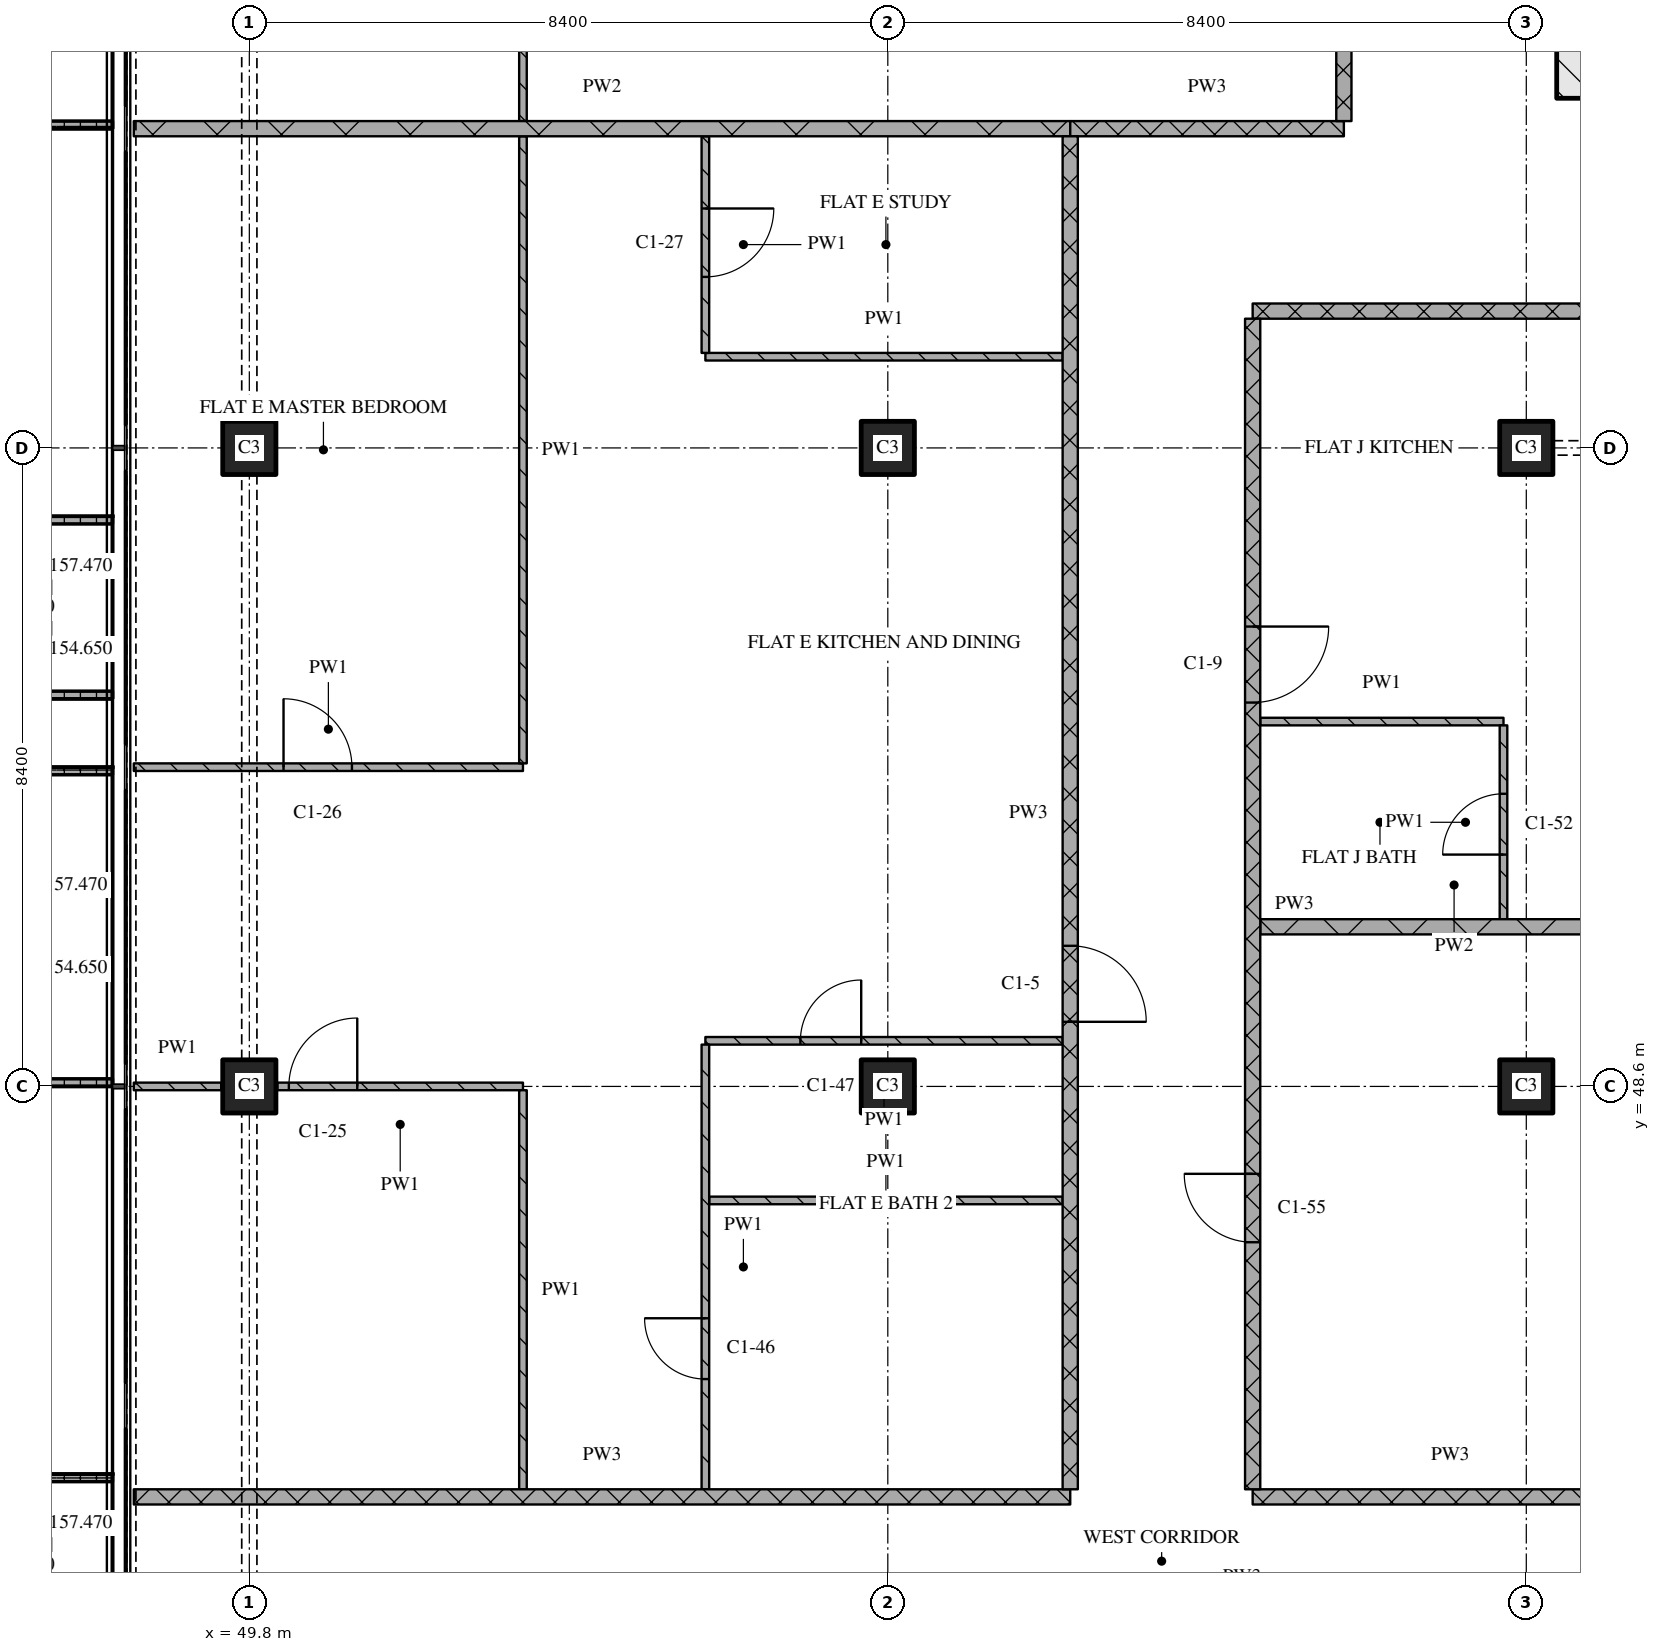
"""IFC4 building model, lengths in metres.
Left out: names, types, materials, properties, quantities, classifications, styles, units other than length and angle.
Written with IfcOpenShell. Run it as: python <this file> out.ifc"""

import sys

from ifc_helpers import new_model, si_unit, direction, frame, frame_2d, origin, origin_2d, place, context, subcontext, project, spatial, polyline, rectangle, outline, extrude, element, fill, save


model = new_model("IFC4")
c1 = context("Model", 3, precision=1e-05, world=origin(), true_north=direction((0.0, 1.0)))
c2 = subcontext(c1, "Body", "Model", "MODEL_VIEW")
j1 = project(units=[si_unit("LENGTHUNIT", "METRE"), si_unit("PLANEANGLEUNIT", "RADIAN")], contexts=[c1])
p1 = place(None, origin())
s1 = spatial("IfcSite", under=j1, at=p1, CompositionType="ELEMENT")
p2 = place(p1, origin())
s2 = spatial("IfcBuilding", under=s1, at=p2, CompositionType="ELEMENT")
p3 = place(p2, frame((0.0, 0.0, 154.65)))
s3 = spatial("IfcBuildingStorey", under=s2, at=p3, CompositionType="ELEMENT", Elevation=154.65)
for number, where, z_axis, x_axis in (
    (1, (49.8, 48.6, 0.0), (0.0, 0.0, 1.0), (1.0, 0.0, 0.0)),
    (2, (49.8, 57.0, 0.0), (0.0, 0.0, 1.0), (1.0, 0.0, 0.0)),
    (3, (58.2, 48.6, 0.0), (0.0, 0.0, 1.0), (1.0, 0.0, 0.0)),
    (4, (58.2, 57.0, 0.0), (0.0, 0.0, 1.0), (1.0, 0.0, 0.0)),
    (5, (66.6, 48.6, 0.0), (0.0, 0.0, 1.0), (1.0, 0.0, 0.0)),
    (6, (66.6, 57.0, 0.0), (0.0, 0.0, 1.0), (1.0, 0.0, 0.0)),
):
    element("IfcColumn", number, at=place(p3, frame(where, z_axis=z_axis, x_axis=x_axis)), inside=s3, PredefinedType="COLUMN", context=c2, shape_type="SweptSolid", body=[
        extrude(rectangle(XDim=0.7, YDim=0.7, at=origin_2d()), origin(), (0.0, 0.0, 1.0), 3.6),
    ])
p4 = place(p3, origin())
e7 = element("IfcWall", 7, at=p4, inside=s3, PredefinedType="SOLIDWALL", context=c2, shape_type="SweptSolid", body=[
    extrude(outline(polyline([(48.0, 65.4), (48.0, 65.3), (46.367, 65.3), (46.367, 61.3), (48.0, 61.3), (48.0, 61.2), (46.267, 61.2), (46.267, 65.4), (48.0, 65.4)])), origin(), (0.0, 0.0, 1.0), 1.0),
])
p5 = place(p3, origin())
e8 = element("IfcWall", 8, at=p5, inside=s3, PredefinedType="SOLIDWALL", context=c2, shape_type="SweptSolid", body=[
    extrude(outline(polyline([(48.0, 56.1), (48.0, 56.0), (46.5, 56.0), (46.5, 53.8), (48.0, 53.8), (48.0, 53.7), (46.4, 53.7), (46.4, 56.1), (48.0, 56.1)])), origin(), (0.0, 0.0, 1.0), 1.0),
])
p6 = place(p3, origin())
e9 = element("IfcWall", 9, at=p6, inside=s3, PredefinedType="SOLIDWALL", context=c2, shape_type="SweptSolid", body=[
    extrude(outline(polyline([(48.0, 52.8), (48.0, 52.7), (46.367, 52.7), (46.367, 48.7), (48.0, 48.7), (48.0, 48.6), (46.267, 48.6), (46.267, 52.8), (48.0, 52.8)])), origin(), (0.0, 0.0, 1.0), 1.0),
])
p7 = place(p3, origin())
e10 = element("IfcWall", 10, at=p7, inside=s3, PredefinedType="SOLIDWALL", context=c2, shape_type="SweptSolid", body=[
    extrude(outline(polyline([(48.0, 43.5), (48.0, 43.4), (46.5, 43.4), (46.5, 41.2), (48.0, 41.2), (48.0, 41.1), (46.4, 41.1), (46.4, 43.5), (48.0, 43.5)])), origin(), (0.0, 0.0, 1.0), 1.0),
])
p8 = place(p3, frame((67.0, 62.0, 0.0), z_axis=(0.0, 0.0, 1.0), x_axis=(1.0, 0.0, 0.0)))
e11 = element("IfcWall", 11, at=p8, inside=s3, PredefinedType="SOLIDWALL", context=c2, shape_type="SweptSolid", body=[
    extrude(rectangle(XDim=41.2, YDim=0.8, at=frame_2d((20.6, 0.0))), origin(), (0.0, 0.0, 1.0), 3.32),
])
p9 = place(p8, frame((20.95, 0.0, 0.0)))
e12 = element("IfcOpeningElement", 12, at=p9, cuts=e11, PredefinedType="OPENING", context=c2, shape_type="SweptSolid", body=[
    extrude(rectangle(XDim=1.8, YDim=2.1, at=frame_2d((0.9, 1.05))), frame((0.0, 0.41, 0.0), z_axis=(0.0, -1.0, 0.0), x_axis=(1.0, 0.0, 0.0)), (0.0, 0.0, 1.0), 0.82),
])
p10 = place(p3, frame((48.28, 43.2, 0.0), z_axis=(0.0, 0.0, 1.0), x_axis=(1.0, 0.0, 0.0)))
e13 = element("IfcWall", 13, at=p10, inside=s3, PredefinedType="PARTITIONING", context=c2, shape_type="SweptSolid", body=[
    extrude(rectangle(XDim=12.32, YDim=0.2, at=frame_2d((6.16, 0.0))), origin(), (0.0, 0.0, 1.0), 3.32),
])
p11 = place(p3, frame((63.0, 43.2, 0.0), z_axis=(0.0, 0.0, 1.0), x_axis=(1.0, 0.0, 0.0)))
e14 = element("IfcWall", 14, at=p11, inside=s3, PredefinedType="PARTITIONING", context=c2, shape_type="SweptSolid", body=[
    extrude(rectangle(XDim=5.2, YDim=0.2, at=frame_2d((2.6, 0.0))), origin(), (0.0, 0.0, 1.0), 3.32),
])
p12 = place(p3, frame((55.85, 47.1, 0.0), z_axis=(0.0, 0.0, 1.0), x_axis=(1.0, 0.0, 0.0)))
e15 = element("IfcWall", 15, at=p12, inside=s3, PredefinedType="PARTITIONING", context=c2, shape_type="SweptSolid", body=[
    extrude(rectangle(XDim=4.65, YDim=0.1, at=frame_2d((2.325, 0.0))), origin(), (0.0, 0.0, 1.0), 3.32),
])
p13 = place(p3, frame((48.28, 48.6, 0.0), z_axis=(0.0, 0.0, 1.0), x_axis=(1.0, 0.0, 0.0)))
e16 = element("IfcWall", 16, at=p13, inside=s3, PredefinedType="PARTITIONING", context=c2, shape_type="SweptSolid", body=[
    extrude(rectangle(XDim=1.15, YDim=0.1, at=frame_2d((0.575, 0.0))), origin(), (0.0, 0.0, 1.0), 3.32),
])
p14 = place(p3, frame((53.4, 48.6, 0.0), z_axis=(0.0, 0.0, 1.0), x_axis=(-1.0, 0.0, 0.0)))
e17 = element("IfcWall", 17, at=p14, inside=s3, PredefinedType="PARTITIONING", context=c2, shape_type="SweptSolid", body=[
    extrude(rectangle(XDim=3.23, YDim=0.1, at=frame_2d((1.615, 0.0))), origin(), (0.0, 0.0, 1.0), 3.32),
])
p15 = place(p14, frame((2.18, 0.0, 0.0)))
e18 = element("IfcOpeningElement", 18, at=p15, cuts=e17, PredefinedType="OPENING", context=c2, shape_type="SweptSolid", body=[
    extrude(rectangle(XDim=0.9, YDim=2.1, at=frame_2d((0.45, 1.05))), frame((0.0, 0.06, 0.0), z_axis=(0.0, -1.0, 0.0), x_axis=(1.0, 0.0, 0.0)), (0.0, 0.0, 1.0), 0.12),
])
p16 = place(p3, frame((60.5, 49.2, 0.0), z_axis=(0.0, 0.0, 1.0), x_axis=(-1.0, 0.0, 0.0)))
e19 = element("IfcWall", 19, at=p16, inside=s3, PredefinedType="PARTITIONING", context=c2, shape_type="SweptSolid", body=[
    extrude(rectangle(XDim=4.7, YDim=0.1, at=frame_2d((2.35, 0.0))), origin(), (0.0, 0.0, 1.0), 3.32),
])
p17 = place(p16, frame((2.65, 0.0, 0.0)))
e20 = element("IfcOpeningElement", 20, at=p17, cuts=e19, PredefinedType="OPENING", context=c2, shape_type="SweptSolid", body=[
    extrude(rectangle(XDim=0.8, YDim=2.1, at=frame_2d((0.4, 1.05))), frame((0.0, 0.06, 0.0), z_axis=(0.0, -1.0, 0.0), x_axis=(1.0, 0.0, 0.0)), (0.0, 0.0, 1.0), 0.12),
])
p18 = place(p3, frame((63.1, 50.7, 0.0), z_axis=(0.0, 0.0, 1.0), x_axis=(1.0, 0.0, 0.0)))
e21 = element("IfcWall", 21, at=p18, inside=s3, PredefinedType="PARTITIONING", context=c2, shape_type="SweptSolid", body=[
    extrude(rectangle(XDim=5.1, YDim=0.2, at=frame_2d((2.55, 0.0))), origin(), (0.0, 0.0, 1.0), 3.32),
])
p19 = place(p3, frame((48.28, 52.8, 0.0), z_axis=(0.0, 0.0, 1.0), x_axis=(1.0, 0.0, 0.0)))
e22 = element("IfcWall", 22, at=p19, inside=s3, PredefinedType="PARTITIONING", context=c2, shape_type="SweptSolid", body=[
    extrude(rectangle(XDim=5.12, YDim=0.1, at=frame_2d((2.56, 0.0))), origin(), (0.0, 0.0, 1.0), 3.32),
])
p20 = place(p19, frame((1.97, 0.0, 0.0)))
e23 = element("IfcOpeningElement", 23, at=p20, cuts=e22, PredefinedType="OPENING", context=c2, shape_type="SweptSolid", body=[
    extrude(rectangle(XDim=0.9, YDim=2.1, at=frame_2d((0.45, 1.05))), frame((0.0, 0.06, 0.0), z_axis=(0.0, -1.0, 0.0), x_axis=(1.0, 0.0, 0.0)), (0.0, 0.0, 1.0), 0.12),
])
p21 = place(p3, frame((63.1, 53.4, 0.0), z_axis=(0.0, 0.0, 1.0), x_axis=(1.0, 0.0, 0.0)))
e24 = element("IfcWall", 24, at=p21, inside=s3, PredefinedType="PARTITIONING", context=c2, shape_type="SweptSolid", body=[
    extrude(rectangle(XDim=3.2, YDim=0.1, at=frame_2d((1.6, 0.0))), origin(), (0.0, 0.0, 1.0), 3.32),
])
p22 = place(p3, frame((55.8, 58.2, 0.0), z_axis=(0.0, 0.0, 1.0), x_axis=(1.0, 0.0, 0.0)))
e25 = element("IfcWall", 25, at=p22, inside=s3, PredefinedType="PARTITIONING", context=c2, shape_type="SweptSolid", body=[
    extrude(rectangle(XDim=4.7, YDim=0.1, at=frame_2d((2.35, 0.0))), origin(), (0.0, 0.0, 1.0), 3.32),
])
p23 = place(p3, frame((63.0, 58.8, 0.0), z_axis=(0.0, 0.0, 1.0), x_axis=(1.0, 0.0, 0.0)))
e26 = element("IfcWall", 26, at=p23, inside=s3, PredefinedType="PARTITIONING", context=c2, shape_type="SweptSolid", body=[
    extrude(rectangle(XDim=10.8, YDim=0.2, at=frame_2d((5.4, 0.0))), origin(), (0.0, 0.0, 1.0), 3.32),
])
p24 = place(p3, frame((60.6, 61.2, 0.0), z_axis=(0.0, 0.0, 1.0), x_axis=(1.0, 0.0, 0.0)))
e27 = element("IfcWall", 27, at=p24, inside=s3, PredefinedType="PARTITIONING", context=c2, shape_type="SweptSolid", body=[
    extrude(rectangle(XDim=3.6, YDim=0.2, at=frame_2d((1.8, 0.0))), origin(), (0.0, 0.0, 1.0), 3.32),
])
p25 = place(p3, frame((48.28, 61.2, 0.0), z_axis=(0.0, 0.0, 1.0), x_axis=(1.0, 0.0, 0.0)))
e28 = element("IfcWall", 28, at=p25, inside=s3, PredefinedType="PARTITIONING", context=c2, shape_type="SweptSolid", body=[
    extrude(rectangle(XDim=12.32, YDim=0.2, at=frame_2d((6.16, 0.0))), origin(), (0.0, 0.0, 1.0), 3.32),
])
p26 = place(p3, frame((53.4, 48.55, 0.0), z_axis=(0.0, 0.0, 1.0), x_axis=(0.0, -1.0, 0.0)))
e29 = element("IfcWall", 29, at=p26, inside=s3, PredefinedType="PARTITIONING", context=c2, shape_type="SweptSolid", body=[
    extrude(rectangle(XDim=5.25, YDim=0.1, at=frame_2d((2.625, 0.0))), origin(), (0.0, 0.0, 1.0), 3.32),
])
p27 = place(p3, frame((55.8, 49.15, 0.0), z_axis=(0.0, 0.0, 1.0), x_axis=(0.0, -1.0, 0.0)))
e30 = element("IfcWall", 30, at=p27, inside=s3, PredefinedType="PARTITIONING", context=c2, shape_type="SweptSolid", body=[
    extrude(rectangle(XDim=5.85, YDim=0.1, at=frame_2d((2.925, 0.0))), origin(), (0.0, 0.0, 1.0), 3.32),
])
p28 = place(p27, frame((3.6, 0.0, 0.0)))
e31 = element("IfcOpeningElement", 31, at=p28, cuts=e30, PredefinedType="OPENING", context=c2, shape_type="SweptSolid", body=[
    extrude(rectangle(XDim=0.8, YDim=2.1, at=frame_2d((0.4, 1.05))), frame((0.0, 0.06, 0.0), z_axis=(0.0, -1.0, 0.0), x_axis=(1.0, 0.0, 0.0)), (0.0, 0.0, 1.0), 0.12),
])
p29 = place(p3, frame((55.8, 61.1, 0.0), z_axis=(0.0, 0.0, 1.0), x_axis=(0.0, -1.0, 0.0)))
e32 = element("IfcWall", 32, at=p29, inside=s3, PredefinedType="PARTITIONING", context=c2, shape_type="SweptSolid", body=[
    extrude(rectangle(XDim=2.85, YDim=0.1, at=frame_2d((1.425, 0.0))), origin(), (0.0, 0.0, 1.0), 3.32),
])
p30 = place(p29, frame((0.95, 0.0, 0.0)))
e33 = element("IfcOpeningElement", 33, at=p30, cuts=e32, PredefinedType="OPENING", context=c2, shape_type="SweptSolid", body=[
    extrude(rectangle(XDim=0.9, YDim=2.1, at=frame_2d((0.45, 1.05))), frame((0.0, 0.06, 0.0), z_axis=(0.0, -1.0, 0.0), x_axis=(1.0, 0.0, 0.0)), (0.0, 0.0, 1.0), 0.12),
])
p31 = place(p3, frame((60.6, 43.3, 0.0), z_axis=(0.0, 0.0, 1.0), x_axis=(0.0, 1.0, 0.0)))
e34 = element("IfcWall", 34, at=p31, inside=s3, PredefinedType="PARTITIONING", context=c2, shape_type="SweptSolid", body=[
    extrude(rectangle(XDim=17.8, YDim=0.2, at=frame_2d((8.9, 0.0))), origin(), (0.0, 0.0, 1.0), 3.32),
])
p32 = place(p31, frame((6.15, 0.0, 0.0)))
e35 = element("IfcOpeningElement", 35, at=p32, cuts=e34, PredefinedType="OPENING", context=c2, shape_type="SweptSolid", body=[
    extrude(rectangle(XDim=1.0, YDim=2.1, at=frame_2d((0.5, 1.05))), frame((0.0, 0.11, 0.0), z_axis=(0.0, -1.0, 0.0), x_axis=(1.0, 0.0, 0.0)), (0.0, 0.0, 1.0), 0.22),
])
p33 = place(p3, frame((63.0, 58.7, 0.0), z_axis=(0.0, 0.0, 1.0), x_axis=(0.0, -1.0, 0.0)))
e36 = element("IfcWall", 36, at=p33, inside=s3, PredefinedType="PARTITIONING", context=c2, shape_type="SweptSolid", body=[
    extrude(rectangle(XDim=15.4, YDim=0.2, at=frame_2d((7.7, 0.0))), origin(), (0.0, 0.0, 1.0), 3.32),
])
p34 = place(p33, frame((4.05, 0.0, 0.0)))
e37 = element("IfcOpeningElement", 37, at=p34, cuts=e36, PredefinedType="OPENING", context=c2, shape_type="SweptSolid", body=[
    extrude(rectangle(XDim=1.0, YDim=2.1, at=frame_2d((0.5, 1.05))), frame((0.0, 0.11, 0.0), z_axis=(0.0, -1.0, 0.0), x_axis=(1.0, 0.0, 0.0)), (0.0, 0.0, 1.0), 0.22),
])
p35 = place(p33, frame((11.25, 0.0, 0.0)))
e38 = element("IfcOpeningElement", 38, at=p35, cuts=e36, PredefinedType="OPENING", context=c2, shape_type="SweptSolid", body=[
    extrude(rectangle(XDim=0.9, YDim=2.1, at=frame_2d((0.45, 1.05))), frame((0.0, 0.11, 0.0), z_axis=(0.0, -1.0, 0.0), x_axis=(1.0, 0.0, 0.0)), (0.0, 0.0, 1.0), 0.22),
])
p36 = place(p3, frame((64.2, 61.3, 0.0), z_axis=(0.0, 0.0, 1.0), x_axis=(0.0, 1.0, 0.0)))
e39 = element("IfcWall", 39, at=p36, inside=s3, PredefinedType="PARTITIONING", context=c2, shape_type="SweptSolid", body=[
    extrude(rectangle(XDim=14.02, YDim=0.2, at=frame_2d((7.01, 0.0))), origin(), (0.0, 0.0, 1.0), 3.32),
])
p37 = place(p36, frame((6.75, 0.0, 0.0)))
e40 = element("IfcOpeningElement", 40, at=p37, cuts=e39, PredefinedType="OPENING", context=c2, shape_type="SweptSolid", body=[
    extrude(rectangle(XDim=1.0, YDim=2.1, at=frame_2d((0.5, 1.05))), frame((0.0, 0.11, 0.0), z_axis=(0.0, -1.0, 0.0), x_axis=(1.0, 0.0, 0.0)), (0.0, 0.0, 1.0), 0.22),
])
p38 = place(p3, frame((66.3, 50.8, 0.0), z_axis=(0.0, 0.0, 1.0), x_axis=(0.0, 1.0, 0.0)))
e41 = element("IfcWall", 41, at=p38, inside=s3, PredefinedType="PARTITIONING", context=c2, shape_type="SweptSolid", body=[
    extrude(rectangle(XDim=2.55, YDim=0.1, at=frame_2d((1.275, 0.0))), origin(), (0.0, 0.0, 1.0), 3.32),
])
p39 = place(p38, frame((0.85, 0.0, 0.0)))
e42 = element("IfcOpeningElement", 42, at=p39, cuts=e41, PredefinedType="OPENING", context=c2, shape_type="SweptSolid", body=[
    extrude(rectangle(XDim=0.8, YDim=2.1, at=frame_2d((0.4, 1.05))), frame((0.0, 0.06, 0.0), z_axis=(0.0, -1.0, 0.0), x_axis=(1.0, 0.0, 0.0)), (0.0, 0.0, 1.0), 0.12),
])
p40 = place(p3, frame((53.4, 61.1, 0.0), z_axis=(0.0, 0.0, 1.0), x_axis=(0.0, -1.0, 0.0)))
e43 = element("IfcWall", 43, at=p40, inside=s3, PredefinedType="PARTITIONING", context=c2, shape_type="SweptSolid", body=[
    extrude(rectangle(XDim=8.25, YDim=0.1, at=frame_2d((4.125, 0.0))), origin(), (0.0, 0.0, 1.0), 3.32),
])
p41 = place(p3, frame((53.4, 61.3, 0.0), z_axis=(0.0, 0.0, 1.0), x_axis=(0.0, 1.0, 0.0)))
e44 = element("IfcWall", 44, at=p41, inside=s3, PredefinedType="PARTITIONING", context=c2, shape_type="SweptSolid", body=[
    extrude(rectangle(XDim=8.25, YDim=0.1, at=frame_2d((4.125, 0.0))), origin(), (0.0, 0.0, 1.0), 3.32),
])
p42 = place(p41, frame((3.65, 0.0, 0.0)))
e45 = element("IfcOpeningElement", 45, at=p42, cuts=e44, PredefinedType="OPENING", context=c2, shape_type="SweptSolid", body=[
    extrude(rectangle(XDim=0.9, YDim=2.1, at=frame_2d((0.45, 1.05))), frame((0.0, 0.06, 0.0), z_axis=(0.0, -1.0, 0.0), x_axis=(1.0, 0.0, 0.0)), (0.0, 0.0, 1.0), 0.12),
])
p43 = place(p15, origin())
e46 = element("IfcDoor", 46, at=p43, inside=s3, OperationType="SINGLE_SWING_RIGHT", PredefinedType="DOOR", context=c2, shape_type="SweptSolid", body=[
    extrude(rectangle(XDim=0.9, YDim=2.1, at=frame_2d((0.45, 1.05))), frame((0.0, 0.025, 0.0), z_axis=(0.0, -1.0, 0.0), x_axis=(1.0, 0.0, 0.0)), (0.0, 0.0, 1.0), 0.05),
])
fill(e18, e46)
p44 = place(p17, origin())
e47 = element("IfcDoor", 47, at=p44, inside=s3, OperationType="SINGLE_SWING_RIGHT", PredefinedType="DOOR", context=c2, shape_type="SweptSolid", body=[
    extrude(rectangle(XDim=0.8, YDim=2.1, at=frame_2d((0.4, 1.05))), frame((0.0, 0.025, 0.0), z_axis=(0.0, -1.0, 0.0), x_axis=(1.0, 0.0, 0.0)), (0.0, 0.0, 1.0), 0.05),
])
fill(e20, e47)
p45 = place(p20, origin())
e48 = element("IfcDoor", 48, at=p45, inside=s3, OperationType="SINGLE_SWING_LEFT", PredefinedType="DOOR", context=c2, shape_type="SweptSolid", body=[
    extrude(rectangle(XDim=0.9, YDim=2.1, at=frame_2d((0.45, 1.05))), frame((0.0, 0.025, 0.0), z_axis=(0.0, -1.0, 0.0), x_axis=(1.0, 0.0, 0.0)), (0.0, 0.0, 1.0), 0.05),
])
fill(e23, e48)
p46 = place(p28, origin())
e49 = element("IfcDoor", 49, at=p46, inside=s3, OperationType="SINGLE_SWING_RIGHT", PredefinedType="DOOR", context=c2, shape_type="SweptSolid", body=[
    extrude(rectangle(XDim=0.8, YDim=2.1, at=frame_2d((0.4, 1.05))), frame((0.0, 0.025, 0.0), z_axis=(0.0, -1.0, 0.0), x_axis=(1.0, 0.0, 0.0)), (0.0, 0.0, 1.0), 0.05),
])
fill(e31, e49)
p47 = place(p30, origin())
e50 = element("IfcDoor", 50, at=p47, inside=s3, OperationType="SINGLE_SWING_LEFT", PredefinedType="DOOR", context=c2, shape_type="SweptSolid", body=[
    extrude(rectangle(XDim=0.9, YDim=2.1, at=frame_2d((0.45, 1.05))), frame((0.0, 0.025, 0.0), z_axis=(0.0, -1.0, 0.0), x_axis=(1.0, 0.0, 0.0)), (0.0, 0.0, 1.0), 0.05),
])
fill(e33, e50)
p48 = place(p32, origin())
e51 = element("IfcDoor", 51, at=p48, inside=s3, OperationType="SINGLE_SWING_RIGHT", PredefinedType="DOOR", context=c2, shape_type="SweptSolid", body=[
    extrude(rectangle(XDim=1.0, YDim=2.1, at=frame_2d((0.5, 1.05))), frame((0.0, 0.025, 0.0), z_axis=(0.0, -1.0, 0.0), x_axis=(1.0, 0.0, 0.0)), (0.0, 0.0, 1.0), 0.05),
])
fill(e35, e51)
p49 = place(p34, origin())
e52 = element("IfcDoor", 52, at=p49, inside=s3, OperationType="SINGLE_SWING_LEFT", PredefinedType="DOOR", context=c2, shape_type="SweptSolid", body=[
    extrude(rectangle(XDim=1.0, YDim=2.1, at=frame_2d((0.5, 1.05))), frame((0.0, 0.025, 0.0), z_axis=(0.0, -1.0, 0.0), x_axis=(1.0, 0.0, 0.0)), (0.0, 0.0, 1.0), 0.05),
])
fill(e37, e52)
p50 = place(p35, origin())
e53 = element("IfcDoor", 53, at=p50, inside=s3, OperationType="SINGLE_SWING_RIGHT", PredefinedType="DOOR", context=c2, shape_type="SweptSolid", body=[
    extrude(rectangle(XDim=0.9, YDim=2.1, at=frame_2d((0.45, 1.05))), frame((0.0, 0.025, 0.0), z_axis=(0.0, -1.0, 0.0), x_axis=(1.0, 0.0, 0.0)), (0.0, 0.0, 1.0), 0.05),
])
fill(e38, e53)
p51 = place(p39, origin())
e54 = element("IfcDoor", 54, at=p51, inside=s3, OperationType="SINGLE_SWING_LEFT", PredefinedType="DOOR", context=c2, shape_type="SweptSolid", body=[
    extrude(rectangle(XDim=0.8, YDim=2.1, at=frame_2d((0.4, 1.05))), frame((0.0, 0.025, 0.0), z_axis=(0.0, -1.0, 0.0), x_axis=(1.0, 0.0, 0.0)), (0.0, 0.0, 1.0), 0.05),
])
fill(e42, e54)
save(model, sys.argv[1])
